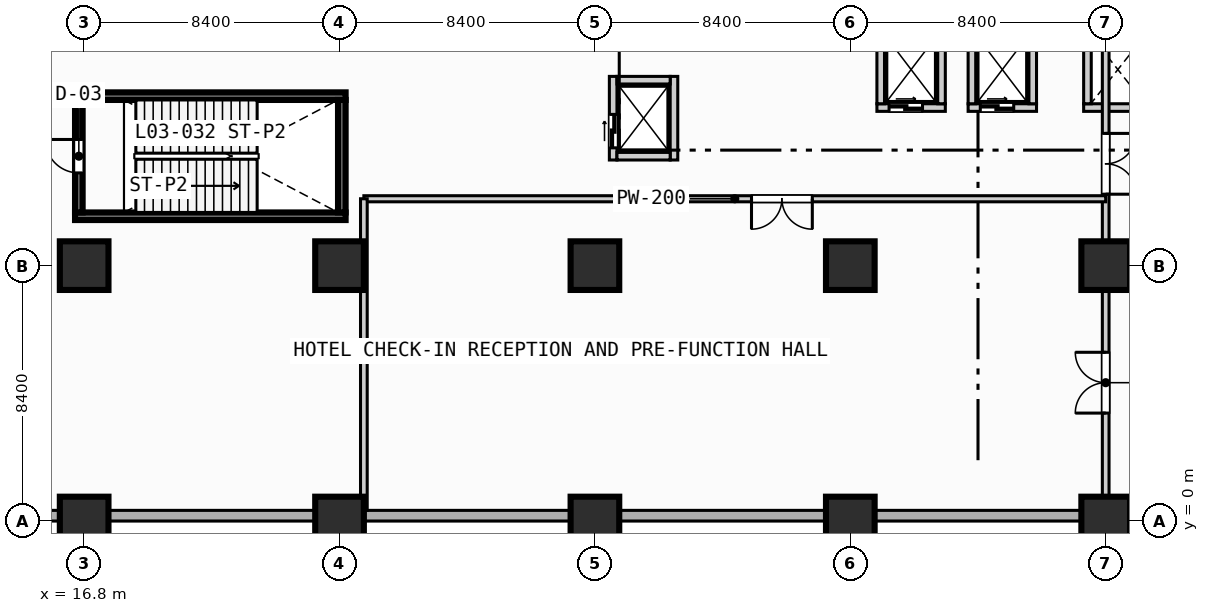
"""IFC4 building model, lengths in metres.
Left out: names, types, materials, properties, quantities, classifications, styles, units other than length and angle.
Written with IfcOpenShell. Run it as: python <this file> out.ifc"""

import sys

from ifc_helpers import new_model, si_unit, direction, frame, frame_2d, origin, origin_2d, place, context, subcontext, project, spatial, rectangle, extrude, element, fill, save


model = new_model("IFC4")
c1 = context("Model", 3, precision=1e-05, world=origin(), true_north=direction((0.0, 1.0)))
c2 = subcontext(c1, "Body", "Model", "MODEL_VIEW")
j1 = project(units=[si_unit("LENGTHUNIT", "METRE"), si_unit("PLANEANGLEUNIT", "RADIAN")], contexts=[c1])
p1 = place(None, origin())
s1 = spatial("IfcSite", under=j1, at=p1, CompositionType="ELEMENT")
p2 = place(p1, origin())
s2 = spatial("IfcBuilding", under=s1, at=p2, CompositionType="ELEMENT")
p3 = place(p2, frame((0.0, 0.0, 15.6)))
s3 = spatial("IfcBuildingStorey", under=s2, at=p3, CompositionType="ELEMENT", Elevation=15.6)
for number, where, z_axis, x_axis in (
    (1, (16.5, 10.025, 0.0), (0.0, 0.0, 1.0), (1.0, 0.0, 0.0)),
    (2, (16.5, 13.975, 0.0), (0.0, 0.0, 1.0), (1.0, 0.0, 0.0)),
):
    element("IfcWall", number, at=place(p3, frame(where, z_axis=z_axis, x_axis=x_axis)), inside=s3, PredefinedType="SOLIDWALL", context=c2, shape_type="SweptSolid", body=[
        extrude(rectangle(XDim=8.9, YDim=0.25, at=frame_2d((4.45, 0.0))), origin(), (0.0, 0.0, 1.0), 4.85),
    ])
p4 = place(p3, frame((25.275, 10.15, 0.0), z_axis=(0.0, 0.0, 1.0), x_axis=(0.0, 1.0, 0.0)))
e3 = element("IfcWall", 3, at=p4, inside=s3, PredefinedType="SOLIDWALL", context=c2, shape_type="SweptSolid", body=[
    extrude(rectangle(XDim=3.7, YDim=0.25, at=frame_2d((1.85, 0.0))), origin(), (0.0, 0.0, 1.0), 4.85),
])
for number, where, z_axis, x_axis in (
    (4, (16.8, 0.0, 0.0), (0.0, 0.0, 1.0), (1.0, 0.0, 0.0)),
    (5, (16.8, 8.4, 0.0), (0.0, 0.0, 1.0), (1.0, 0.0, 0.0)),
    (6, (25.2, 0.0, 0.0), (0.0, 0.0, 1.0), (1.0, 0.0, 0.0)),
    (7, (25.2, 8.4, 0.0), (0.0, 0.0, 1.0), (1.0, 0.0, 0.0)),
    (8, (33.6, 0.0, 0.0), (0.0, 0.0, 1.0), (1.0, 0.0, 0.0)),
    (9, (33.6, 8.4, 0.0), (0.0, 0.0, 1.0), (1.0, 0.0, 0.0)),
    (10, (42.0, 0.0, 0.0), (0.0, 0.0, 1.0), (1.0, 0.0, 0.0)),
    (11, (42.0, 8.4, 0.0), (0.0, 0.0, 1.0), (1.0, 0.0, 0.0)),
    (12, (50.4, 0.0, 0.0), (0.0, 0.0, 1.0), (1.0, 0.0, 0.0)),
    (13, (50.4, 8.4, 0.0), (0.0, 0.0, 1.0), (1.0, 0.0, 0.0)),
):
    element("IfcColumn", number, at=place(p3, frame(where, z_axis=z_axis, x_axis=x_axis)), inside=s3, PredefinedType="COLUMN", context=c2, shape_type="SweptSolid", body=[
        extrude(rectangle(XDim=1.6, YDim=1.6, at=origin_2d()), origin(), (0.0, 0.0, 1.0), 5.2),
    ])
p5 = place(p3, frame((89.225, 0.175, 0.0), z_axis=(0.0, 0.0, 1.0), x_axis=(-1.0, 0.0, 0.0)))
e14 = element("IfcWall", 14, at=p5, inside=s3, PredefinedType="STANDARD", context=c2, shape_type="SweptSolid", body=[
    extrude(rectangle(XDim=86.05, YDim=0.35, at=frame_2d((43.025, 0.0))), origin(), (0.0, 0.0, 1.0), 4.85),
])
p6 = place(p3, frame((34.2, 11.875, 0.0), z_axis=(0.0, 0.0, 1.0), x_axis=(0.0, 1.0, 0.0)))
e15 = element("IfcWall", 15, at=p6, inside=s3, PredefinedType="SOLIDWALL", context=c2, shape_type="SweptSolid", body=[
    extrude(rectangle(XDim=2.75, YDim=0.25, at=frame_2d((1.375, 0.0))), origin(), (0.0, 0.0, 1.0), 4.85),
])
p7 = place(p6, frame((0.4, 0.0, 0.0)))
e16 = element("IfcOpeningElement", 16, at=p7, cuts=e15, PredefinedType="OPENING", context=c2, shape_type="SweptSolid", body=[
    extrude(rectangle(XDim=1.1, YDim=2.15, at=frame_2d((0.55, 1.075))), frame((0.0, 0.135, 0.0), z_axis=(0.0, -1.0, 0.0), x_axis=(1.0, 0.0, 0.0)), (0.0, 0.0, 1.0), 0.27),
])
p8 = place(p3, frame((36.2, 11.875, 0.0), z_axis=(0.0, 0.0, 1.0), x_axis=(0.0, 1.0, 0.0)))
e17 = element("IfcWall", 17, at=p8, inside=s3, PredefinedType="SOLIDWALL", context=c2, shape_type="SweptSolid", body=[
    extrude(rectangle(XDim=2.75, YDim=0.25, at=frame_2d((1.375, 0.0))), origin(), (0.0, 0.0, 1.0), 4.85),
])
for number, where, z_axis, x_axis in (
    (18, (34.325, 12.0, 0.0), (0.0, 0.0, 1.0), (1.0, 0.0, 0.0)),
    (19, (34.325, 14.5, 0.0), (0.0, 0.0, 1.0), (1.0, 0.0, 0.0)),
):
    element("IfcWall", number, at=place(p3, frame(where, z_axis=z_axis, x_axis=x_axis)), inside=s3, PredefinedType="SOLIDWALL", context=c2, shape_type="SweptSolid", body=[
        extrude(rectangle(XDim=1.75, YDim=0.25, at=frame_2d((0.875, 0.0))), origin(), (0.0, 0.0, 1.0), 4.85),
    ])
p9 = place(p3, frame((42.875, 13.6, 0.0), z_axis=(0.0, 0.0, 1.0), x_axis=(1.0, 0.0, 0.0)))
e20 = element("IfcWall", 20, at=p9, inside=s3, PredefinedType="SOLIDWALL", context=c2, shape_type="SweptSolid", body=[
    extrude(rectangle(XDim=2.25, YDim=0.25, at=frame_2d((1.125, 0.0))), origin(), (0.0, 0.0, 1.0), 4.85),
])
p10 = place(p9, frame((0.4, 0.0, 0.0)))
e21 = element("IfcOpeningElement", 21, at=p10, cuts=e20, PredefinedType="OPENING", context=c2, shape_type="SweptSolid", body=[
    extrude(rectangle(XDim=1.1, YDim=2.15, at=frame_2d((0.55, 1.075))), frame((0.0, 0.135, 0.0), z_axis=(0.0, -1.0, 0.0), x_axis=(1.0, 0.0, 0.0)), (0.0, 0.0, 1.0), 0.27),
])
for number, where, z_axis, x_axis in (
    (22, (43.0, 13.725, 0.0), (0.0, 0.0, 1.0), (0.0, 1.0, 0.0)),
    (23, (45.0, 13.725, 0.0), (0.0, 0.0, 1.0), (0.0, 1.0, 0.0)),
):
    element("IfcWall", number, at=place(p3, frame(where, z_axis=z_axis, x_axis=x_axis)), inside=s3, PredefinedType="SOLIDWALL", context=c2, shape_type="SweptSolid", body=[
        extrude(rectangle(XDim=2.25, YDim=0.25, at=frame_2d((1.125, 0.0))), origin(), (0.0, 0.0, 1.0), 4.85),
    ])
p11 = place(p3, frame((45.875, 13.6, 0.0), z_axis=(0.0, 0.0, 1.0), x_axis=(1.0, 0.0, 0.0)))
e24 = element("IfcWall", 24, at=p11, inside=s3, PredefinedType="SOLIDWALL", context=c2, shape_type="SweptSolid", body=[
    extrude(rectangle(XDim=2.25, YDim=0.25, at=frame_2d((1.125, 0.0))), origin(), (0.0, 0.0, 1.0), 4.85),
])
p12 = place(p11, frame((0.4, 0.0, 0.0)))
e25 = element("IfcOpeningElement", 25, at=p12, cuts=e24, PredefinedType="OPENING", context=c2, shape_type="SweptSolid", body=[
    extrude(rectangle(XDim=1.1, YDim=2.15, at=frame_2d((0.55, 1.075))), frame((0.0, 0.135, 0.0), z_axis=(0.0, -1.0, 0.0), x_axis=(1.0, 0.0, 0.0)), (0.0, 0.0, 1.0), 0.27),
])
for number, where, z_axis, x_axis in (
    (26, (46.0, 13.725, 0.0), (0.0, 0.0, 1.0), (0.0, 1.0, 0.0)),
    (27, (48.0, 13.725, 0.0), (0.0, 0.0, 1.0), (0.0, 1.0, 0.0)),
    (28, (49.675, 13.6, 0.0), (0.0, 0.0, 1.0), (1.0, 0.0, 0.0)),
    (29, (49.8, 13.725, 0.0), (0.0, 0.0, 1.0), (0.0, 1.0, 0.0)),
):
    element("IfcWall", number, at=place(p3, frame(where, z_axis=z_axis, x_axis=x_axis)), inside=s3, PredefinedType="SOLIDWALL", context=c2, shape_type="SweptSolid", body=[
        extrude(rectangle(XDim=2.25, YDim=0.25, at=frame_2d((1.125, 0.0))), origin(), (0.0, 0.0, 1.0), 4.85),
    ])
p13 = place(p3, frame((16.625, 10.15, 0.0), z_axis=(0.0, 0.0, 1.0), x_axis=(0.0, 1.0, 0.0)))
e30 = element("IfcWall", 30, at=p13, inside=s3, PredefinedType="SOLIDWALL", context=c2, shape_type="SweptSolid", body=[
    extrude(rectangle(XDim=3.7, YDim=0.25, at=frame_2d((1.85, 0.0))), origin(), (0.0, 0.0, 1.0), 4.85),
])
p14 = place(p13, frame((1.3, 0.0, 0.0)))
e31 = element("IfcOpeningElement", 31, at=p14, cuts=e30, PredefinedType="OPENING", context=c2, shape_type="SweptSolid", body=[
    extrude(rectangle(XDim=1.1, YDim=2.15, at=frame_2d((0.55, 1.075))), frame((0.0, 0.135, 0.0), z_axis=(0.0, -1.0, 0.0), x_axis=(1.0, 0.0, 0.0)), (0.0, 0.0, 1.0), 0.27),
])
p15 = place(p3, frame((50.4, 0.35, 0.0), z_axis=(0.0, 0.0, 1.0), x_axis=(0.0, 1.0, 0.0)))
e32 = element("IfcWall", 32, at=p15, inside=s3, PredefinedType="PARTITIONING", context=c2, shape_type="SweptSolid", body=[
    extrude(rectangle(XDim=16.45, YDim=0.22, at=frame_2d((8.225, 0.0))), origin(), (0.0, 0.0, 1.0), 4.0),
])
p16 = place(p15, frame((3.2, 0.0, 0.0)))
e33 = element("IfcOpeningElement", 33, at=p16, cuts=e32, PredefinedType="OPENING", context=c2, shape_type="SweptSolid", body=[
    extrude(rectangle(XDim=2.0, YDim=2.15, at=frame_2d((1.0, 1.075))), frame((0.0, 0.12, 0.0), z_axis=(0.0, -1.0, 0.0), x_axis=(1.0, 0.0, 0.0)), (0.0, 0.0, 1.0), 0.24),
])
p17 = place(p15, frame((10.4, 0.0, 0.0)))
e34 = element("IfcOpeningElement", 34, at=p17, cuts=e32, PredefinedType="OPENING", context=c2, shape_type="SweptSolid", body=[
    extrude(rectangle(XDim=2.0, YDim=2.15, at=frame_2d((1.0, 1.075))), frame((0.0, 0.12, 0.0), z_axis=(0.0, -1.0, 0.0), x_axis=(1.0, 0.0, 0.0)), (0.0, 0.0, 1.0), 0.24),
])
p18 = place(p3, frame((26.0, 10.6, 0.0), z_axis=(0.0, 0.0, 1.0), x_axis=(1.0, 0.0, 0.0)))
e35 = element("IfcWall", 35, at=p18, inside=s3, PredefinedType="PARTITIONING", context=c2, shape_type="SweptSolid", body=[
    extrude(rectangle(XDim=24.4, YDim=0.2, at=frame_2d((12.2, 0.0))), origin(), (0.0, 0.0, 1.0), 4.85),
])
p19 = place(p18, frame((12.75, 0.0, 0.0)))
e36 = element("IfcOpeningElement", 36, at=p19, cuts=e35, PredefinedType="OPENING", context=c2, shape_type="SweptSolid", body=[
    extrude(rectangle(XDim=2.0, YDim=2.15, at=frame_2d((1.0, 1.075))), frame((0.0, 0.11, 0.0), z_axis=(0.0, -1.0, 0.0), x_axis=(1.0, 0.0, 0.0)), (0.0, 0.0, 1.0), 0.22),
])
p20 = place(p3, frame((26.0, 0.35, 0.0), z_axis=(0.0, 0.0, 1.0), x_axis=(0.0, 1.0, 0.0)))
e37 = element("IfcWall", 37, at=p20, inside=s3, PredefinedType="PARTITIONING", context=c2, shape_type="SweptSolid", body=[
    extrude(rectangle(XDim=10.25, YDim=0.22, at=frame_2d((5.125, 0.0))), origin(), (0.0, 0.0, 1.0), 4.85),
])
p21 = place(p7, origin())
e38 = element("IfcDoor", 38, at=p21, inside=s3, OperationType="SLIDING_TO_LEFT", PredefinedType="DOOR", context=c2, shape_type="SweptSolid", body=[
    extrude(rectangle(XDim=1.1, YDim=2.15, at=frame_2d((0.55, 1.075))), frame((0.0, 0.025, 0.0), z_axis=(0.0, -1.0, 0.0), x_axis=(1.0, 0.0, 0.0)), (0.0, 0.0, 1.0), 0.05),
])
fill(e16, e38)
p22 = place(p10, origin())
e39 = element("IfcDoor", 39, at=p22, inside=s3, OperationType="SLIDING_TO_LEFT", PredefinedType="DOOR", context=c2, shape_type="SweptSolid", body=[
    extrude(rectangle(XDim=1.1, YDim=2.15, at=frame_2d((0.55, 1.075))), frame((0.0, 0.025, 0.0), z_axis=(0.0, -1.0, 0.0), x_axis=(1.0, 0.0, 0.0)), (0.0, 0.0, 1.0), 0.05),
])
fill(e21, e39)
p23 = place(p12, origin())
e40 = element("IfcDoor", 40, at=p23, inside=s3, OperationType="SLIDING_TO_LEFT", PredefinedType="DOOR", context=c2, shape_type="SweptSolid", body=[
    extrude(rectangle(XDim=1.1, YDim=2.15, at=frame_2d((0.55, 1.075))), frame((0.0, 0.025, 0.0), z_axis=(0.0, -1.0, 0.0), x_axis=(1.0, 0.0, 0.0)), (0.0, 0.0, 1.0), 0.05),
])
fill(e25, e40)
p24 = place(p14, origin())
e41 = element("IfcDoor", 41, at=p24, inside=s3, OperationType="SINGLE_SWING_RIGHT", PredefinedType="DOOR", context=c2, shape_type="SweptSolid", body=[
    extrude(rectangle(XDim=1.1, YDim=2.15, at=frame_2d((0.55, 1.075))), frame((0.0, 0.025, 0.0), z_axis=(0.0, -1.0, 0.0), x_axis=(1.0, 0.0, 0.0)), (0.0, 0.0, 1.0), 0.05),
])
fill(e31, e41)
p25 = place(p16, origin())
e42 = element("IfcDoor", 42, at=p25, inside=s3, OperationType="SINGLE_SWING_LEFT", PredefinedType="DOOR", context=c2, shape_type="SweptSolid", body=[
    extrude(rectangle(XDim=2.0, YDim=2.15, at=frame_2d((1.0, 1.075))), frame((0.0, 0.025, 0.0), z_axis=(0.0, -1.0, 0.0), x_axis=(1.0, 0.0, 0.0)), (0.0, 0.0, 1.0), 0.05),
])
fill(e33, e42)
p26 = place(p17, origin())
e43 = element("IfcDoor", 43, at=p26, inside=s3, OperationType="SINGLE_SWING_RIGHT", PredefinedType="DOOR", context=c2, shape_type="SweptSolid", body=[
    extrude(rectangle(XDim=2.0, YDim=2.15, at=frame_2d((1.0, 1.075))), frame((0.0, 0.025, 0.0), z_axis=(0.0, -1.0, 0.0), x_axis=(1.0, 0.0, 0.0)), (0.0, 0.0, 1.0), 0.05),
])
fill(e34, e43)
p27 = place(p19, origin())
e44 = element("IfcDoor", 44, at=p27, inside=s3, OperationType="SINGLE_SWING_RIGHT", PredefinedType="DOOR", context=c2, shape_type="SweptSolid", body=[
    extrude(rectangle(XDim=2.0, YDim=2.15, at=frame_2d((1.0, 1.075))), frame((0.0, 0.025, 0.0), z_axis=(0.0, -1.0, 0.0), x_axis=(1.0, 0.0, 0.0)), (0.0, 0.0, 1.0), 0.05),
])
fill(e36, e44)
save(model, sys.argv[1])
